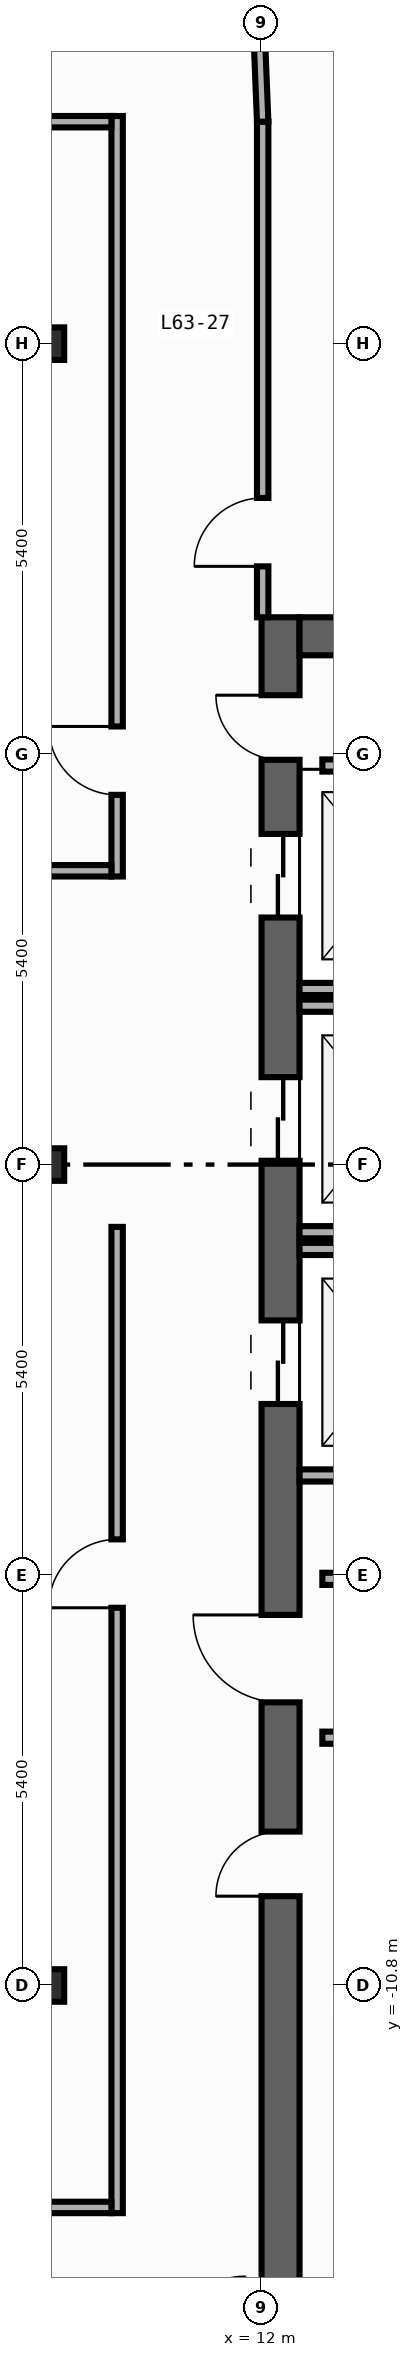
"""IFC4 building model, lengths in metres.
Left out: names, types, materials, properties, quantities, classifications, styles, units other than length and angle.
Written with IfcOpenShell. Run it as: python <this file> out.ifc"""

import sys

from ifc_helpers import new_model, si_unit, direction, frame, frame_2d, origin, origin_2d, place, context, subcontext, project, spatial, rectangle, i_section, extrude, element, fill, save


model = new_model("IFC4")
c1 = context("Model", 3, precision=1e-05, world=origin(), true_north=direction((0.0, 1.0)))
c2 = subcontext(c1, "Body", "Model", "MODEL_VIEW")
j1 = project(units=[si_unit("LENGTHUNIT", "METRE"), si_unit("PLANEANGLEUNIT", "RADIAN")], contexts=[c1])
p1 = place(None, origin())
s1 = spatial("IfcSite", under=j1, at=p1, CompositionType="ELEMENT")
p2 = place(p1, origin())
s2 = spatial("IfcBuilding", under=s1, at=p2, CompositionType="ELEMENT")
p3 = place(p2, frame((0.0, 0.0, 265.6)))
s3 = spatial("IfcBuildingStorey", under=s2, at=p3, CompositionType="ELEMENT", Elevation=265.6)
p4 = place(p3, frame((12.25, -19.8, 0.0), z_axis=(0.0, 0.0, 1.0), x_axis=(0.0, 1.0, 0.0)))
e1 = element("IfcWall", 1, at=p4, inside=s3, PredefinedType="SHEAR", context=c2, shape_type="SweptSolid", body=[
    extrude(rectangle(XDim=27.0, YDim=0.5, at=frame_2d((13.5, 0.0))), origin(), (0.0, 0.0, 1.0), 3.34),
])
p5 = place(p4, frame((23.05, 0.0, 0.0)))
e2 = element("IfcOpeningElement", 2, at=p5, cuts=e1, PredefinedType="OPENING", context=c2, shape_type="SweptSolid", body=[
    extrude(rectangle(XDim=1.1, YDim=2.2, at=frame_2d((0.55, 1.1))), frame((0.0, 0.26, 0.0), z_axis=(0.0, -1.0, 0.0), x_axis=(1.0, 0.0, 0.0)), (0.0, 0.0, 1.0), 0.52),
])
p6 = place(p4, frame((19.85, 0.0, 0.0)))
e3 = element("IfcOpeningElement", 3, at=p6, cuts=e1, PredefinedType="OPENING", context=c2, shape_type="SweptSolid", body=[
    extrude(rectangle(XDim=1.1, YDim=2.2, at=frame_2d((0.55, 1.1))), frame((0.0, 0.26, 0.0), z_axis=(0.0, -1.0, 0.0), x_axis=(1.0, 0.0, 0.0)), (0.0, 0.0, 1.0), 0.52),
])
p7 = place(p4, frame((16.65, 0.0, 0.0)))
e4 = element("IfcOpeningElement", 4, at=p7, cuts=e1, PredefinedType="OPENING", context=c2, shape_type="SweptSolid", body=[
    extrude(rectangle(XDim=1.1, YDim=2.2, at=frame_2d((0.55, 1.1))), frame((0.0, 0.26, 0.0), z_axis=(0.0, -1.0, 0.0), x_axis=(1.0, 0.0, 0.0)), (0.0, 0.0, 1.0), 0.52),
])
p8 = place(p4, frame((10.175, 0.0, 0.0)))
e5 = element("IfcOpeningElement", 5, at=p8, cuts=e1, PredefinedType="OPENING", context=c2, shape_type="SweptSolid", body=[
    extrude(rectangle(XDim=0.85, YDim=2.1, at=frame_2d((0.425, 1.05))), frame((0.0, 0.26, 0.0), z_axis=(0.0, -1.0, 0.0), x_axis=(1.0, 0.0, 0.0)), (0.0, 0.0, 1.0), 0.52),
])
p9 = place(p4, frame((12.725, 0.0, 0.0)))
e6 = element("IfcOpeningElement", 6, at=p9, cuts=e1, PredefinedType="OPENING", context=c2, shape_type="SweptSolid", body=[
    extrude(rectangle(XDim=1.15, YDim=2.2, at=frame_2d((0.575, 1.1))), frame((0.0, 0.26, 0.0), z_axis=(0.0, -1.0, 0.0), x_axis=(1.0, 0.0, 0.0)), (0.0, 0.0, 1.0), 0.52),
])
p10 = place(p4, frame((25.125, 0.0, 0.0)))
e7 = element("IfcOpeningElement", 7, at=p10, cuts=e1, PredefinedType="OPENING", context=c2, shape_type="SweptSolid", body=[
    extrude(rectangle(XDim=0.85, YDim=2.1, at=frame_2d((0.425, 1.05))), frame((0.0, 0.26, 0.0), z_axis=(0.0, -1.0, 0.0), x_axis=(1.0, 0.0, 0.0)), (0.0, 0.0, 1.0), 0.52),
])
p11 = place(p3, frame((12.5, 6.95, 0.0), z_axis=(0.0, 0.0, 1.0), x_axis=(1.0, 0.0, 0.0)))
e8 = element("IfcWall", 8, at=p11, inside=s3, PredefinedType="SHEAR", context=c2, shape_type="SweptSolid", body=[
    extrude(rectangle(XDim=7.4, YDim=0.5, at=frame_2d((3.7, 0.0))), origin(), (0.0, 0.0, 1.0), 3.34),
])
for number, where, z_axis, x_axis in (
    (9, (9.2, -10.8, 0.0), (0.0, 0.0, 1.0), (1.0, 0.0, 0.0)),
    (10, (9.2, 0.0, 0.0), (0.0, 0.0, 1.0), (1.0, 0.0, 0.0)),
    (11, (9.2, 10.8, 0.0), (0.0, 0.0, 1.0), (1.0, 0.0, 0.0)),
):
    element("IfcColumn", number, at=place(p3, frame(where, z_axis=z_axis, x_axis=x_axis)), inside=s3, PredefinedType="COLUMN", context=c2, shape_type="SweptSolid", body=[
        extrude(i_section(OverallWidth=0.407, OverallDepth=0.428, WebThickness=0.02, FlangeThickness=0.035, FilletRadius=0.022, at=origin_2d()), origin(), (0.0, 0.0, 1.0), 3.6),
    ])
for number, where, z_axis, x_axis in (
    (12, (12.5, 2.31, 0.0), (0.0, 0.0, 1.0), (1.0, 0.0, 0.0)),
    (13, (12.5, -0.89, 0.0), (0.0, 0.0, 1.0), (1.0, 0.0, 0.0)),
    (14, (12.5, 2.09, 0.0), (0.0, 0.0, 1.0), (1.0, 0.0, 0.0)),
    (15, (12.5, -4.09, 0.0), (0.0, 0.0, 1.0), (1.0, 0.0, 0.0)),
    (16, (12.5, -1.11, 0.0), (0.0, 0.0, 1.0), (1.0, 0.0, 0.0)),
):
    element("IfcWall", number, at=place(p3, frame(where, z_axis=z_axis, x_axis=x_axis)), inside=s3, PredefinedType="STANDARD", context=c2, shape_type="SweptSolid", body=[
        extrude(rectangle(XDim=2.49, YDim=0.16, at=frame_2d((1.245, 0.0))), origin(), (0.0, 0.0, 1.0), 3.34),
    ])
for number, where, z_axis, x_axis in (
    (17, (12.8, -5.45, 0.0), (0.0, 0.0, 1.0), (1.0, 0.0, 0.0)),
    (18, (12.8, -7.54, 0.0), (0.0, 0.0, 1.0), (1.0, 0.0, 0.0)),
    (19, (12.8, 5.25, 0.0), (0.0, 0.0, 1.0), (1.0, 0.0, 0.0)),
):
    element("IfcWall", number, at=place(p3, frame(where, z_axis=z_axis, x_axis=x_axis)), inside=s3, PredefinedType="STANDARD", context=c2, shape_type="SweptSolid", body=[
        extrude(rectangle(XDim=2.6, YDim=0.16, at=frame_2d((1.3, 0.0))), origin(), (0.0, 0.0, 1.0), 3.34),
    ])
p12 = place(p3, frame((12.015, 7.2, 0.0), z_axis=(0.0, 0.0, 1.0), x_axis=(0.0, 1.0, 0.0)))
e20 = element("IfcWall", 20, at=p12, inside=s3, PredefinedType="PARTITIONING", context=c2, shape_type="SweptSolid", body=[
    extrude(rectangle(XDim=6.52, YDim=0.15, at=frame_2d((3.26, 0.0))), origin(), (0.0, 0.0, 1.0), 3.34),
])
p13 = place(p12, frame((0.67, 0.0, 0.0)))
e21 = element("IfcOpeningElement", 21, at=p13, cuts=e20, PredefinedType="OPENING", context=c2, shape_type="SweptSolid", body=[
    extrude(rectangle(XDim=0.9, YDim=2.15, at=frame_2d((0.45, 1.075))), frame((0.0, 0.085, 0.0), z_axis=(0.0, -1.0, 0.0), x_axis=(1.0, 0.0, 0.0)), (0.0, 0.0, 1.0), 0.17),
])
p14 = place(p3, frame((10.1, 3.79, 0.0), z_axis=(0.0, 0.0, 1.0), x_axis=(0.0, 1.0, 0.0)))
e22 = element("IfcWall", 22, at=p14, inside=s3, PredefinedType="PARTITIONING", context=c2, shape_type="SweptSolid", body=[
    extrude(rectangle(XDim=10.005, YDim=0.15, at=frame_2d((5.002, 0.0))), origin(), (0.0, 0.0, 1.0), 3.34),
])
p15 = place(p14, frame((1.074, 0.0, 0.0)))
e23 = element("IfcOpeningElement", 23, at=p15, cuts=e22, PredefinedType="OPENING", context=c2, shape_type="SweptSolid", body=[
    extrude(rectangle(XDim=0.9, YDim=2.15, at=frame_2d((0.45, 1.075))), frame((0.0, 0.085, 0.0), z_axis=(0.0, -1.0, 0.0), x_axis=(1.0, 0.0, 0.0)), (0.0, 0.0, 1.0), 0.17),
])
p16 = place(p3, frame((10.1, -13.795, 0.0), z_axis=(0.0, 0.0, 1.0), x_axis=(0.0, 1.0, 0.0)))
e24 = element("IfcWall", 24, at=p16, inside=s3, PredefinedType="PARTITIONING", context=c2, shape_type="SweptSolid", body=[
    extrude(rectangle(XDim=12.975, YDim=0.15, at=frame_2d((6.487, 0.0))), origin(), (0.0, 0.0, 1.0), 3.34),
])
p17 = place(p16, frame((7.964, 0.0, 0.0)))
e25 = element("IfcOpeningElement", 25, at=p17, cuts=e24, PredefinedType="OPENING", context=c2, shape_type="SweptSolid", body=[
    extrude(rectangle(XDim=0.9, YDim=2.15, at=frame_2d((0.45, 1.075))), frame((0.0, 0.085, 0.0), z_axis=(0.0, -1.0, 0.0), x_axis=(1.0, 0.0, 0.0)), (0.0, 0.0, 1.0), 0.17),
])
p18 = place(p3, frame((3.97, 3.865, 0.0), z_axis=(0.0, 0.0, 1.0), x_axis=(1.0, 0.0, 0.0)))
e26 = element("IfcWall", 26, at=p18, inside=s3, PredefinedType="PARTITIONING", context=c2, shape_type="SweptSolid", body=[
    extrude(rectangle(XDim=6.055, YDim=0.15, at=frame_2d((3.027, 0.0))), origin(), (0.0, 0.0, 1.0), 3.34),
])
p19 = place(p18, frame((0.46, 0.0, 0.0)))
e27 = element("IfcOpeningElement", 27, at=p19, cuts=e26, PredefinedType="OPENING", context=c2, shape_type="SweptSolid", body=[
    extrude(rectangle(XDim=0.9, YDim=2.15, at=frame_2d((0.45, 1.075))), frame((0.0, 0.085, 0.0), z_axis=(0.0, -1.0, 0.0), x_axis=(1.0, 0.0, 0.0)), (0.0, 0.0, 1.0), 0.17),
])
p20 = place(p3, frame((12.015, 13.72, 0.0), z_axis=(0.0, 0.0, 1.0), x_axis=(-0.040046877756, 0.99919780203, 0.0)))
e28 = element("IfcWall", 28, at=p20, inside=s3, PredefinedType="PARTITIONING", context=c2, shape_type="SweptSolid", body=[
    extrude(rectangle(XDim=1.731, YDim=0.15, at=frame_2d((0.866, 0.0))), origin(), (0.0, 0.0, 1.0), 3.34),
])
p21 = place(p3, frame((3.97, 13.72, 0.0), z_axis=(0.0, 0.0, 1.0), x_axis=(1.0, 0.0, 0.0)))
e29 = element("IfcWall", 29, at=p21, inside=s3, PredefinedType="PARTITIONING", context=c2, shape_type="SweptSolid", body=[
    extrude(rectangle(XDim=6.055, YDim=0.15, at=frame_2d((3.027, 0.0))), origin(), (0.0, 0.0, 1.0), 3.34),
])
p22 = place(p21, frame((0.863, 0.0, 0.0)))
e30 = element("IfcOpeningElement", 30, at=p22, cuts=e29, PredefinedType="OPENING", context=c2, shape_type="SweptSolid", body=[
    extrude(rectangle(XDim=0.9, YDim=2.15, at=frame_2d((0.45, 1.075))), frame((0.0, 0.085, 0.0), z_axis=(0.0, -1.0, 0.0), x_axis=(1.0, 0.0, 0.0)), (0.0, 0.0, 1.0), 0.17),
])
p23 = place(p3, frame((4.14, -13.72, 0.0), z_axis=(0.0, 0.0, 1.0), x_axis=(1.0, 0.0, 0.0)))
e31 = element("IfcWall", 31, at=p23, inside=s3, PredefinedType="PARTITIONING", context=c2, shape_type="SweptSolid", body=[
    extrude(rectangle(XDim=5.885, YDim=0.15, at=frame_2d((2.942, 0.0))), origin(), (0.0, 0.0, 1.0), 3.34),
])
p24 = place(p23, frame((0.866, 0.0, 0.0)))
e32 = element("IfcOpeningElement", 32, at=p24, cuts=e31, PredefinedType="OPENING", context=c2, shape_type="SweptSolid", body=[
    extrude(rectangle(XDim=0.9, YDim=2.15, at=frame_2d((0.45, 1.075))), frame((0.0, 0.085, 0.0), z_axis=(0.0, -1.0, 0.0), x_axis=(1.0, 0.0, 0.0)), (0.0, 0.0, 1.0), 0.17),
])
p25 = place(p5, origin())
e33 = element("IfcDoor", 33, at=p25, inside=s3, OperationType="DOUBLE_DOOR_SLIDING", PredefinedType="DOOR", context=c2, shape_type="SweptSolid", body=[
    extrude(rectangle(XDim=1.1, YDim=2.2, at=frame_2d((0.55, 1.1))), frame((0.0, 0.025, 0.0), z_axis=(0.0, -1.0, 0.0), x_axis=(1.0, 0.0, 0.0)), (0.0, 0.0, 1.0), 0.05),
])
fill(e2, e33)
p26 = place(p6, origin())
e34 = element("IfcDoor", 34, at=p26, inside=s3, OperationType="DOUBLE_DOOR_SLIDING", PredefinedType="DOOR", context=c2, shape_type="SweptSolid", body=[
    extrude(rectangle(XDim=1.1, YDim=2.2, at=frame_2d((0.55, 1.1))), frame((0.0, 0.025, 0.0), z_axis=(0.0, -1.0, 0.0), x_axis=(1.0, 0.0, 0.0)), (0.0, 0.0, 1.0), 0.05),
])
fill(e3, e34)
p27 = place(p7, origin())
e35 = element("IfcDoor", 35, at=p27, inside=s3, OperationType="DOUBLE_DOOR_SLIDING", PredefinedType="DOOR", context=c2, shape_type="SweptSolid", body=[
    extrude(rectangle(XDim=1.1, YDim=2.2, at=frame_2d((0.55, 1.1))), frame((0.0, 0.025, 0.0), z_axis=(0.0, -1.0, 0.0), x_axis=(1.0, 0.0, 0.0)), (0.0, 0.0, 1.0), 0.05),
])
fill(e4, e35)
p28 = place(p8, origin())
e36 = element("IfcDoor", 36, at=p28, inside=s3, OperationType="SINGLE_SWING_LEFT", PredefinedType="DOOR", context=c2, shape_type="SweptSolid", body=[
    extrude(rectangle(XDim=0.85, YDim=2.1, at=frame_2d((0.425, 1.05))), frame((0.0, 0.025, 0.0), z_axis=(0.0, -1.0, 0.0), x_axis=(1.0, 0.0, 0.0)), (0.0, 0.0, 1.0), 0.05),
])
fill(e5, e36)
p29 = place(p9, origin())
e37 = element("IfcDoor", 37, at=p29, inside=s3, OperationType="SINGLE_SWING_RIGHT", PredefinedType="DOOR", context=c2, shape_type="SweptSolid", body=[
    extrude(rectangle(XDim=1.15, YDim=2.2, at=frame_2d((0.575, 1.1))), frame((0.0, 0.025, 0.0), z_axis=(0.0, -1.0, 0.0), x_axis=(1.0, 0.0, 0.0)), (0.0, 0.0, 1.0), 0.05),
])
fill(e6, e37)
p30 = place(p10, origin())
e38 = element("IfcDoor", 38, at=p30, inside=s3, OperationType="SINGLE_SWING_RIGHT", PredefinedType="DOOR", context=c2, shape_type="SweptSolid", body=[
    extrude(rectangle(XDim=0.85, YDim=2.1, at=frame_2d((0.425, 1.05))), frame((0.0, 0.025, 0.0), z_axis=(0.0, -1.0, 0.0), x_axis=(1.0, 0.0, 0.0)), (0.0, 0.0, 1.0), 0.05),
])
fill(e7, e38)
p31 = place(p13, origin())
e39 = element("IfcDoor", 39, at=p31, inside=s3, OperationType="SINGLE_SWING_LEFT", PredefinedType="DOOR", context=c2, shape_type="SweptSolid", body=[
    extrude(rectangle(XDim=0.9, YDim=2.15, at=frame_2d((0.45, 1.075))), frame((0.0, 0.025, 0.0), z_axis=(0.0, -1.0, 0.0), x_axis=(1.0, 0.0, 0.0)), (0.0, 0.0, 1.0), 0.05),
])
fill(e21, e39)
p32 = place(p15, origin())
e40 = element("IfcDoor", 40, at=p32, inside=s3, OperationType="SINGLE_SWING_RIGHT", PredefinedType="DOOR", context=c2, shape_type="SweptSolid", body=[
    extrude(rectangle(XDim=0.9, YDim=2.15, at=frame_2d((0.45, 1.075))), frame((0.0, 0.025, 0.0), z_axis=(0.0, -1.0, 0.0), x_axis=(1.0, 0.0, 0.0)), (0.0, 0.0, 1.0), 0.05),
])
fill(e23, e40)
p33 = place(p17, origin())
e41 = element("IfcDoor", 41, at=p33, inside=s3, OperationType="SINGLE_SWING_LEFT", PredefinedType="DOOR", context=c2, shape_type="SweptSolid", body=[
    extrude(rectangle(XDim=0.9, YDim=2.15, at=frame_2d((0.45, 1.075))), frame((0.0, 0.025, 0.0), z_axis=(0.0, -1.0, 0.0), x_axis=(1.0, 0.0, 0.0)), (0.0, 0.0, 1.0), 0.05),
])
fill(e25, e41)
save(model, sys.argv[1])
